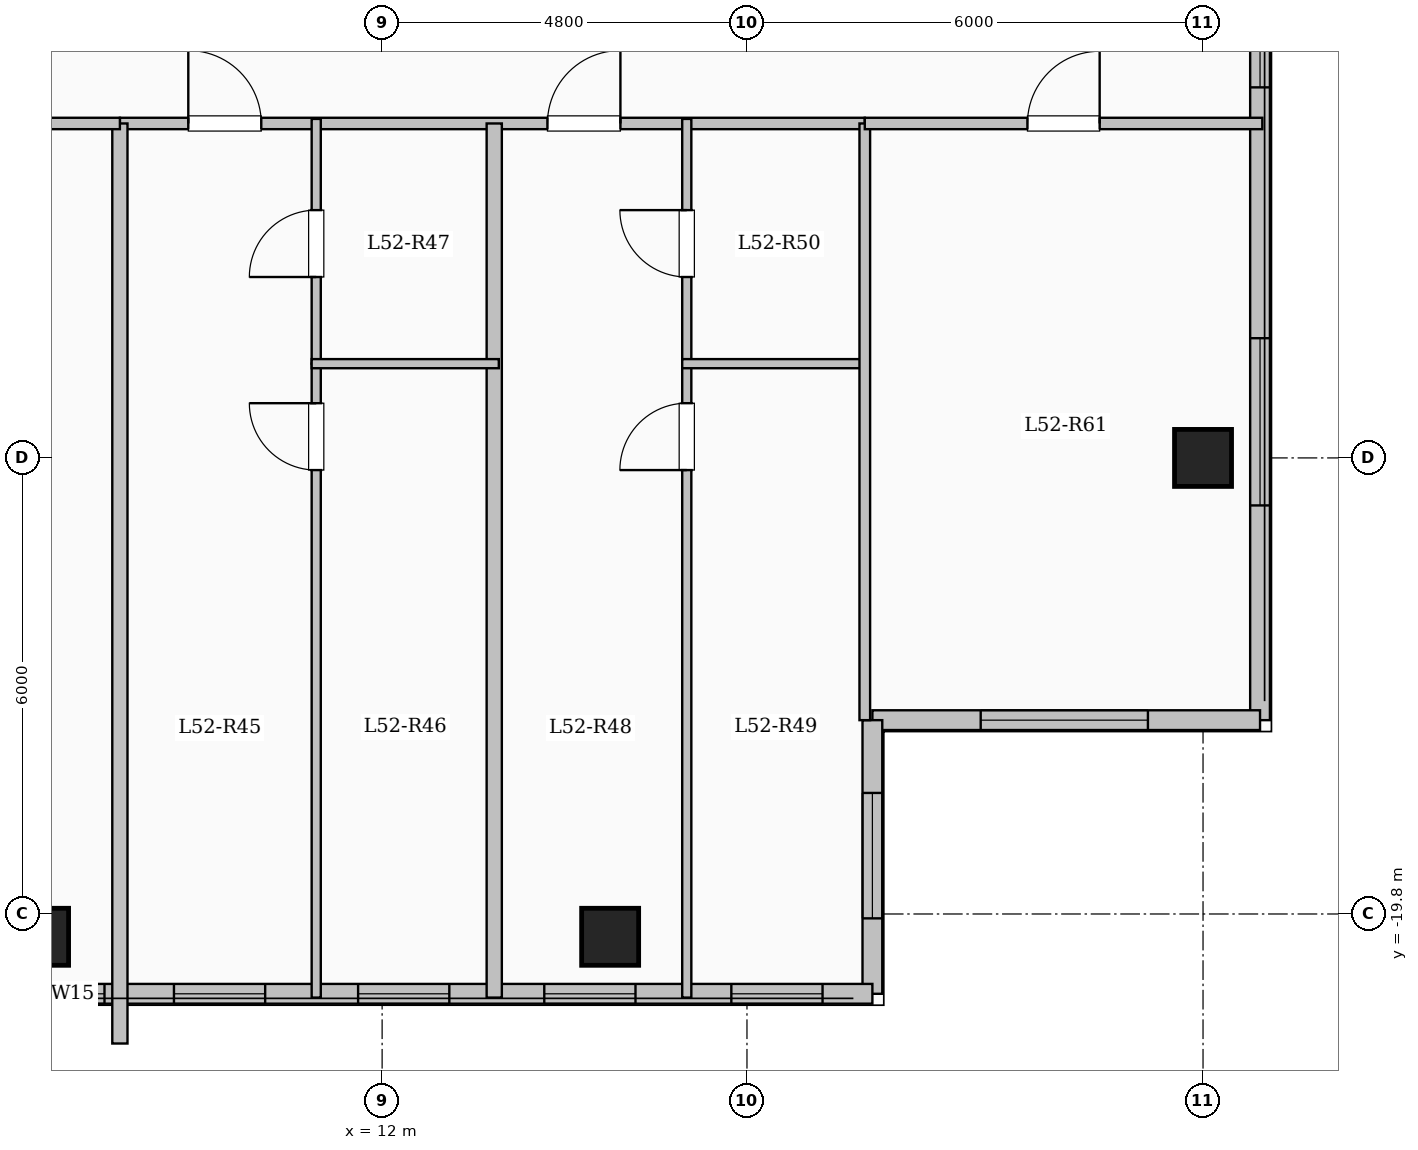
"""IFC4 building model, lengths in metres.
Left out: names, types, materials, properties, quantities, classifications, styles, units other than length and angle.
Written with IfcOpenShell. Run it as: python <this file> out.ifc"""

import sys

from ifc_helpers import new_model, si_unit, direction, frame, frame_2d, origin, origin_2d, place, context, subcontext, project, spatial, rectangle, extrude, element, fill, save


model = new_model("IFC4")
c1 = context("Model", 3, precision=1e-05, world=origin(), true_north=direction((0.0, 1.0)))
c2 = subcontext(c1, "Body", "Model", "MODEL_VIEW")
j1 = project(units=[si_unit("LENGTHUNIT", "METRE"), si_unit("PLANEANGLEUNIT", "RADIAN")], contexts=[c1])
p1 = place(None, origin())
s1 = spatial("IfcSite", under=j1, at=p1, CompositionType="ELEMENT")
p2 = place(p1, origin())
s2 = spatial("IfcBuilding", under=s1, at=p2, CompositionType="ELEMENT")
p3 = place(p2, frame((0.0, 0.0, 193.6)))
s3 = spatial("IfcBuildingStorey", under=s2, at=p3, CompositionType="ELEMENT", Elevation=193.6)
for number, where, z_axis, x_axis in (
    (1, (7.5, -20.1, 0.0), (0.0, 0.0, 1.0), (1.0, 0.0, 0.0)),
    (2, (15.0, -20.1, 0.0), (0.0, 0.0, 1.0), (1.0, 0.0, 0.0)),
    (3, (22.8, -13.8, 0.0), (0.0, 0.0, 1.0), (1.0, 0.0, 0.0)),
):
    element("IfcColumn", number, at=place(p3, frame(where, z_axis=z_axis, x_axis=x_axis)), inside=s3, PredefinedType="COLUMN", context=c2, shape_type="SweptSolid", body=[
        extrude(rectangle(XDim=0.75, YDim=0.75, at=origin_2d()), origin(), (0.0, 0.0, 1.0), 3.35),
    ])
p4 = place(p3, frame((23.55, 17.25, 0.0), z_axis=(0.0, 0.0, 1.0), x_axis=(0.0, -1.0, 0.0)))
e4 = element("IfcWall", 4, at=p4, inside=s3, PredefinedType="SOLIDWALL", context=c2, shape_type="SweptSolid", body=[
    extrude(rectangle(XDim=34.5, YDim=0.26, at=frame_2d((17.25, 0.0))), origin(), (0.0, 0.0, 1.0), 3.1),
])
p5 = place(p4, frame((1.375, 0.0, 0.9)))
e5 = element("IfcOpeningElement", 5, at=p5, cuts=e4, PredefinedType="OPENING", context=c2, shape_type="SweptSolid", body=[
    extrude(rectangle(XDim=2.0, YDim=1.7, at=frame_2d((1.0, 0.85))), frame((0.0, 0.14, 0.0), z_axis=(0.0, -1.0, 0.0), x_axis=(1.0, 0.0, 0.0)), (0.0, 0.0, 1.0), 0.28),
])
p6 = place(p4, frame((5.125, 0.0, 0.95)))
e6 = element("IfcOpeningElement", 6, at=p6, cuts=e4, PredefinedType="OPENING", context=c2, shape_type="SweptSolid", body=[
    extrude(rectangle(XDim=1.0, YDim=1.5, at=frame_2d((0.5, 0.75))), frame((0.0, 0.14, 0.0), z_axis=(0.0, -1.0, 0.0), x_axis=(1.0, 0.0, 0.0)), (0.0, 0.0, 1.0), 0.28),
])
p7 = place(p4, frame((14.5, 0.0, 0.9)))
e7 = element("IfcOpeningElement", 7, at=p7, cuts=e4, PredefinedType="OPENING", context=c2, shape_type="SweptSolid", body=[
    extrude(rectangle(XDim=2.0, YDim=1.7, at=frame_2d((1.0, 0.85))), frame((0.0, 0.14, 0.0), z_axis=(0.0, -1.0, 0.0), x_axis=(1.0, 0.0, 0.0)), (0.0, 0.0, 1.0), 0.28),
])
p8 = place(p4, frame((24.975, 0.0, 0.95)))
e8 = element("IfcOpeningElement", 8, at=p8, cuts=e4, PredefinedType="OPENING", context=c2, shape_type="SweptSolid", body=[
    extrude(rectangle(XDim=1.2, YDim=1.5, at=frame_2d((0.6, 0.75))), frame((0.0, 0.14, 0.0), z_axis=(0.0, -1.0, 0.0), x_axis=(1.0, 0.0, 0.0)), (0.0, 0.0, 1.0), 0.28),
])
p9 = place(p4, frame((29.475, 0.0, 0.9)))
e9 = element("IfcOpeningElement", 9, at=p9, cuts=e4, PredefinedType="OPENING", context=c2, shape_type="SweptSolid", body=[
    extrude(rectangle(XDim=2.2, YDim=1.75, at=frame_2d((1.1, 0.875))), frame((0.0, 0.14, 0.0), z_axis=(0.0, -1.0, 0.0), x_axis=(1.0, 0.0, 0.0)), (0.0, 0.0, 1.0), 0.28),
])
p10 = place(p3, frame((23.55, -17.25, 0.0), z_axis=(0.0, 0.0, 1.0), x_axis=(-1.0, 0.0, 0.0)))
e10 = element("IfcWall", 10, at=p10, inside=s3, PredefinedType="SOLIDWALL", context=c2, shape_type="SweptSolid", body=[
    extrude(rectangle(XDim=5.1, YDim=0.26, at=frame_2d((2.55, 0.0))), origin(), (0.0, 0.0, 1.0), 3.1),
])
p11 = place(p10, frame((1.475, 0.0, 0.9)))
e11 = element("IfcOpeningElement", 11, at=p11, cuts=e10, PredefinedType="OPENING", context=c2, shape_type="SweptSolid", body=[
    extrude(rectangle(XDim=2.2, YDim=1.75, at=frame_2d((1.1, 0.875))), frame((0.0, 0.14, 0.0), z_axis=(0.0, -1.0, 0.0), x_axis=(1.0, 0.0, 0.0)), (0.0, 0.0, 1.0), 0.28),
])
p12 = place(p3, frame((18.45, -17.25, 0.0), z_axis=(0.0, 0.0, 1.0), x_axis=(0.0, -1.0, 0.0)))
e12 = element("IfcWall", 12, at=p12, inside=s3, PredefinedType="SOLIDWALL", context=c2, shape_type="SweptSolid", body=[
    extrude(rectangle(XDim=3.6, YDim=0.26, at=frame_2d((1.8, 0.0))), origin(), (0.0, 0.0, 1.0), 3.1),
])
p13 = place(p12, frame((0.958, 0.0, 0.9)))
e13 = element("IfcOpeningElement", 13, at=p13, cuts=e12, PredefinedType="OPENING", context=c2, shape_type="SweptSolid", body=[
    extrude(rectangle(XDim=1.65, YDim=1.6, at=frame_2d((0.825, 0.8))), frame((0.0, 0.14, 0.0), z_axis=(0.0, -1.0, 0.0), x_axis=(1.0, 0.0, 0.0)), (0.0, 0.0, 1.0), 0.28),
])
p14 = place(p3, frame((18.45, -20.85, 0.0), z_axis=(0.0, 0.0, 1.0), x_axis=(-1.0, 0.0, 0.0)))
e14 = element("IfcWall", 14, at=p14, inside=s3, PredefinedType="SOLIDWALL", context=c2, shape_type="SweptSolid", body=[
    extrude(rectangle(XDim=11.1, YDim=0.26, at=frame_2d((5.55, 0.0))), origin(), (0.0, 0.0, 1.0), 3.1),
])
p15 = place(p14, frame((0.656, 0.0, 0.95)))
e15 = element("IfcOpeningElement", 15, at=p15, cuts=e14, PredefinedType="OPENING", context=c2, shape_type="SweptSolid", body=[
    extrude(rectangle(XDim=1.2, YDim=1.5, at=frame_2d((0.6, 0.75))), frame((0.0, 0.14, 0.0), z_axis=(0.0, -1.0, 0.0), x_axis=(1.0, 0.0, 0.0)), (0.0, 0.0, 1.0), 0.28),
])
p16 = place(p14, frame((3.117, 0.0, 0.95)))
e16 = element("IfcOpeningElement", 16, at=p16, cuts=e14, PredefinedType="OPENING", context=c2, shape_type="SweptSolid", body=[
    extrude(rectangle(XDim=1.2, YDim=1.5, at=frame_2d((0.6, 0.75))), frame((0.0, 0.14, 0.0), z_axis=(0.0, -1.0, 0.0), x_axis=(1.0, 0.0, 0.0)), (0.0, 0.0, 1.0), 0.28),
])
p17 = place(p14, frame((5.566, 0.0, 0.95)))
e17 = element("IfcOpeningElement", 17, at=p17, cuts=e14, PredefinedType="OPENING", context=c2, shape_type="SweptSolid", body=[
    extrude(rectangle(XDim=1.2, YDim=1.5, at=frame_2d((0.6, 0.75))), frame((0.0, 0.14, 0.0), z_axis=(0.0, -1.0, 0.0), x_axis=(1.0, 0.0, 0.0)), (0.0, 0.0, 1.0), 0.28),
])
p18 = place(p14, frame((7.989, 0.0, 0.95)))
e18 = element("IfcOpeningElement", 18, at=p18, cuts=e14, PredefinedType="OPENING", context=c2, shape_type="SweptSolid", body=[
    extrude(rectangle(XDim=1.2, YDim=1.5, at=frame_2d((0.6, 0.75))), frame((0.0, 0.14, 0.0), z_axis=(0.0, -1.0, 0.0), x_axis=(1.0, 0.0, 0.0)), (0.0, 0.0, 1.0), 0.28),
])
p19 = place(p14, frame((10.103, 0.0, 0.95)))
e19 = element("IfcOpeningElement", 19, at=p19, cuts=e14, PredefinedType="OPENING", context=c2, shape_type="SweptSolid", body=[
    extrude(rectangle(XDim=0.85, YDim=1.5, at=frame_2d((0.425, 0.75))), frame((0.0, 0.14, 0.0), z_axis=(0.0, -1.0, 0.0), x_axis=(1.0, 0.0, 0.0)), (0.0, 0.0, 1.0), 0.28),
])
p20 = place(p3, frame((8.55, -9.4, 0.0), z_axis=(0.0, 0.0, 1.0), x_axis=(1.0, 0.0, 0.0)))
e20 = element("IfcWall", 20, at=p20, inside=s3, PredefinedType="PARTITIONING", context=c2, shape_type="SweptSolid", body=[
    extrude(rectangle(XDim=9.8, YDim=0.15, at=frame_2d((4.9, 0.0))), origin(), (0.0, 0.0, 1.0), 3.1),
])
p21 = place(p20, frame((0.9, 0.0, 0.0)))
e21 = element("IfcOpeningElement", 21, at=p21, cuts=e20, PredefinedType="OPENING", context=c2, shape_type="SweptSolid", body=[
    extrude(rectangle(XDim=0.96, YDim=2.15, at=frame_2d((0.48, 1.075))), frame((0.0, 0.085, 0.0), z_axis=(0.0, -1.0, 0.0), x_axis=(1.0, 0.0, 0.0)), (0.0, 0.0, 1.0), 0.17),
])
p22 = place(p20, frame((5.625, 0.0, 0.0)))
e22 = element("IfcOpeningElement", 22, at=p22, cuts=e20, PredefinedType="OPENING", context=c2, shape_type="SweptSolid", body=[
    extrude(rectangle(XDim=0.96, YDim=2.15, at=frame_2d((0.48, 1.075))), frame((0.0, 0.085, 0.0), z_axis=(0.0, -1.0, 0.0), x_axis=(1.0, 0.0, 0.0)), (0.0, 0.0, 1.0), 0.17),
])
p23 = place(p3, frame((13.475, -20.9, 0.0), z_axis=(0.0, 0.0, 1.0), x_axis=(0.0, 1.0, 0.0)))
e23 = element("IfcWall", 23, at=p23, inside=s3, PredefinedType="SOLIDWALL", context=c2, shape_type="SweptSolid", body=[
    extrude(rectangle(XDim=11.5, YDim=0.2, at=frame_2d((5.75, 0.0))), origin(), (0.0, 0.0, 1.0), 3.1),
])
p24 = place(p3, frame((11.133, -20.9, 0.0), z_axis=(0.0, 0.0, 1.0), x_axis=(0.0, 1.0, 0.0)))
e24 = element("IfcWall", 24, at=p24, inside=s3, PredefinedType="PARTITIONING", context=c2, shape_type="SweptSolid", body=[
    extrude(rectangle(XDim=8.34, YDim=0.12, at=frame_2d((4.17, 0.0))), origin(), (0.0, 0.0, 1.0), 3.1),
])
p25 = place(p24, frame((6.94, 0.0, 0.0)))
e25 = element("IfcOpeningElement", 25, at=p25, cuts=e24, PredefinedType="OPENING", context=c2, shape_type="SweptSolid", body=[
    extrude(rectangle(XDim=0.88, YDim=2.1, at=frame_2d((0.44, 1.05))), frame((0.0, 0.07, 0.0), z_axis=(0.0, -1.0, 0.0), x_axis=(1.0, 0.0, 0.0)), (0.0, 0.0, 1.0), 0.14),
])
p26 = place(p3, frame((11.133, -12.56, 0.0), z_axis=(0.0, 0.0, 1.0), x_axis=(0.0, 1.0, 0.0)))
e26 = element("IfcWall", 26, at=p26, inside=s3, PredefinedType="PARTITIONING", context=c2, shape_type="SweptSolid", body=[
    extrude(rectangle(XDim=3.22, YDim=0.12, at=frame_2d((1.61, 0.0))), origin(), (0.0, 0.0, 1.0), 3.1),
])
p27 = place(p26, frame((1.14, 0.0, 0.0)))
e27 = element("IfcOpeningElement", 27, at=p27, cuts=e26, PredefinedType="OPENING", context=c2, shape_type="SweptSolid", body=[
    extrude(rectangle(XDim=0.88, YDim=2.1, at=frame_2d((0.44, 1.05))), frame((0.0, 0.07, 0.0), z_axis=(0.0, -1.0, 0.0), x_axis=(1.0, 0.0, 0.0)), (0.0, 0.0, 1.0), 0.14),
])
p28 = place(p3, frame((11.073, -12.56, 0.0), z_axis=(0.0, 0.0, 1.0), x_axis=(1.0, 0.0, 0.0)))
e28 = element("IfcWall", 28, at=p28, inside=s3, PredefinedType="PARTITIONING", context=c2, shape_type="SweptSolid", body=[
    extrude(rectangle(XDim=2.462, YDim=0.12, at=frame_2d((1.231, 0.0))), origin(), (0.0, 0.0, 1.0), 2.725),
])
p29 = place(p3, frame((16.008, -20.9, 0.0), z_axis=(0.0, 0.0, 1.0), x_axis=(0.0, 1.0, 0.0)))
e29 = element("IfcWall", 29, at=p29, inside=s3, PredefinedType="PARTITIONING", context=c2, shape_type="SweptSolid", body=[
    extrude(rectangle(XDim=8.34, YDim=0.12, at=frame_2d((4.17, 0.0))), origin(), (0.0, 0.0, 1.0), 3.1),
])
p30 = place(p29, frame((6.94, 0.0, 0.0)))
e30 = element("IfcOpeningElement", 30, at=p30, cuts=e29, PredefinedType="OPENING", context=c2, shape_type="SweptSolid", body=[
    extrude(rectangle(XDim=0.88, YDim=2.1, at=frame_2d((0.44, 1.05))), frame((0.0, 0.07, 0.0), z_axis=(0.0, -1.0, 0.0), x_axis=(1.0, 0.0, 0.0)), (0.0, 0.0, 1.0), 0.14),
])
p31 = place(p3, frame((16.008, -12.56, 0.0), z_axis=(0.0, 0.0, 1.0), x_axis=(0.0, 1.0, 0.0)))
e31 = element("IfcWall", 31, at=p31, inside=s3, PredefinedType="PARTITIONING", context=c2, shape_type="SweptSolid", body=[
    extrude(rectangle(XDim=3.22, YDim=0.12, at=frame_2d((1.61, 0.0))), origin(), (0.0, 0.0, 1.0), 3.1),
])
p32 = place(p31, frame((1.14, 0.0, 0.0)))
e32 = element("IfcOpeningElement", 32, at=p32, cuts=e31, PredefinedType="OPENING", context=c2, shape_type="SweptSolid", body=[
    extrude(rectangle(XDim=0.88, YDim=2.1, at=frame_2d((0.44, 1.05))), frame((0.0, 0.07, 0.0), z_axis=(0.0, -1.0, 0.0), x_axis=(1.0, 0.0, 0.0)), (0.0, 0.0, 1.0), 0.14),
])
p33 = place(p3, frame((15.948, -12.56, 0.0), z_axis=(0.0, 0.0, 1.0), x_axis=(1.0, 0.0, 0.0)))
e33 = element("IfcWall", 33, at=p33, inside=s3, PredefinedType="PARTITIONING", context=c2, shape_type="SweptSolid", body=[
    extrude(rectangle(XDim=2.462, YDim=0.12, at=frame_2d((1.231, 0.0))), origin(), (0.0, 0.0, 1.0), 3.1),
])
p34 = place(p3, frame((8.55, -21.504, 0.0), z_axis=(0.0, 0.0, 1.0), x_axis=(0.0, 1.0, 0.0)))
e34 = element("IfcWall", 34, at=p34, inside=s3, PredefinedType="SOLIDWALL", context=c2, shape_type="SweptSolid", body=[
    extrude(rectangle(XDim=12.104, YDim=0.2, at=frame_2d((6.052, 0.0))), origin(), (0.0, 0.0, 1.0), 3.1),
])
p35 = place(p3, frame((-8.55, -9.4, 0.0), z_axis=(0.0, 0.0, 1.0), x_axis=(1.0, 0.0, 0.0)))
e35 = element("IfcWall", 35, at=p35, inside=s3, PredefinedType="PARTITIONING", context=c2, shape_type="SweptSolid", body=[
    extrude(rectangle(XDim=17.1, YDim=0.15, at=frame_2d((8.55, 0.0))), origin(), (0.0, 0.0, 1.0), 3.1),
])
p36 = place(p35, frame((1.9, 0.0, 0.0)))
e36 = element("IfcOpeningElement", 36, at=p36, cuts=e35, PredefinedType="OPENING", context=c2, shape_type="SweptSolid", body=[
    extrude(rectangle(XDim=0.95, YDim=2.15, at=frame_2d((0.475, 1.075))), frame((0.0, 0.085, 0.0), z_axis=(0.0, -1.0, 0.0), x_axis=(1.0, 0.0, 0.0)), (0.0, 0.0, 1.0), 0.17),
])
p37 = place(p35, frame((10.5, 0.0, 0.0)))
e37 = element("IfcOpeningElement", 37, at=p37, cuts=e35, PredefinedType="OPENING", context=c2, shape_type="SweptSolid", body=[
    extrude(rectangle(XDim=0.95, YDim=2.15, at=frame_2d((0.475, 1.075))), frame((0.0, 0.085, 0.0), z_axis=(0.0, -1.0, 0.0), x_axis=(1.0, 0.0, 0.0)), (0.0, 0.0, 1.0), 0.17),
])
p38 = place(p3, frame((18.35, -17.25, 0.0), z_axis=(0.0, 0.0, 1.0), x_axis=(0.0, 1.0, 0.0)))
e38 = element("IfcWall", 38, at=p38, inside=s3, PredefinedType="PARTITIONING", context=c2, shape_type="SweptSolid", body=[
    extrude(rectangle(XDim=7.85, YDim=0.14, at=frame_2d((3.925, 0.0))), origin(), (0.0, 0.0, 1.0), 3.1),
])
p39 = place(p3, frame((18.35, -9.4, 0.0), z_axis=(0.0, 0.0, 1.0), x_axis=(1.0, 0.0, 0.0)))
e39 = element("IfcWall", 39, at=p39, inside=s3, PredefinedType="PARTITIONING", context=c2, shape_type="SweptSolid", body=[
    extrude(rectangle(XDim=5.23, YDim=0.15, at=frame_2d((2.615, 0.0))), origin(), (0.0, 0.0, 1.0), 3.1),
])
p40 = place(p39, frame((2.14, 0.0, 0.0)))
e40 = element("IfcOpeningElement", 40, at=p40, cuts=e39, PredefinedType="OPENING", context=c2, shape_type="SweptSolid", body=[
    extrude(rectangle(XDim=0.95, YDim=2.15, at=frame_2d((0.475, 1.075))), frame((0.0, 0.085, 0.0), z_axis=(0.0, -1.0, 0.0), x_axis=(1.0, 0.0, 0.0)), (0.0, 0.0, 1.0), 0.17),
])
p41 = place(p8, origin())
e41 = element("IfcWindow", 41, at=p41, inside=s3, PartitioningType="SINGLE_PANEL", PredefinedType="WINDOW", context=c2, shape_type="SweptSolid", body=[
    extrude(rectangle(XDim=1.2, YDim=1.5, at=frame_2d((0.6, 0.75))), frame((0.0, 0.03, 0.0), z_axis=(0.0, -1.0, 0.0), x_axis=(1.0, 0.0, 0.0)), (0.0, 0.0, 1.0), 0.06),
])
fill(e8, e41)
p42 = place(p9, origin())
e42 = element("IfcWindow", 42, at=p42, inside=s3, PartitioningType="SINGLE_PANEL", PredefinedType="WINDOW", context=c2, shape_type="SweptSolid", body=[
    extrude(rectangle(XDim=2.2, YDim=1.75, at=frame_2d((1.1, 0.875))), frame((0.0, 0.03, 0.0), z_axis=(0.0, -1.0, 0.0), x_axis=(1.0, 0.0, 0.0)), (0.0, 0.0, 1.0), 0.06),
])
fill(e9, e42)
p43 = place(p11, origin())
e43 = element("IfcWindow", 43, at=p43, inside=s3, PartitioningType="SINGLE_PANEL", PredefinedType="WINDOW", context=c2, shape_type="SweptSolid", body=[
    extrude(rectangle(XDim=2.2, YDim=1.75, at=frame_2d((1.1, 0.875))), frame((0.0, 0.03, 0.0), z_axis=(0.0, -1.0, 0.0), x_axis=(1.0, 0.0, 0.0)), (0.0, 0.0, 1.0), 0.06),
])
fill(e11, e43)
p44 = place(p13, origin())
e44 = element("IfcWindow", 44, at=p44, inside=s3, PartitioningType="SINGLE_PANEL", PredefinedType="WINDOW", context=c2, shape_type="SweptSolid", body=[
    extrude(rectangle(XDim=1.65, YDim=1.6, at=frame_2d((0.825, 0.8))), frame((0.0, 0.03, 0.0), z_axis=(0.0, -1.0, 0.0), x_axis=(1.0, 0.0, 0.0)), (0.0, 0.0, 1.0), 0.06),
])
fill(e13, e44)
p45 = place(p15, origin())
e45 = element("IfcWindow", 45, at=p45, inside=s3, PartitioningType="SINGLE_PANEL", PredefinedType="WINDOW", context=c2, shape_type="SweptSolid", body=[
    extrude(rectangle(XDim=1.2, YDim=1.5, at=frame_2d((0.6, 0.75))), frame((0.0, 0.03, 0.0), z_axis=(0.0, -1.0, 0.0), x_axis=(1.0, 0.0, 0.0)), (0.0, 0.0, 1.0), 0.06),
])
fill(e15, e45)
p46 = place(p16, origin())
e46 = element("IfcWindow", 46, at=p46, inside=s3, PartitioningType="SINGLE_PANEL", PredefinedType="WINDOW", context=c2, shape_type="SweptSolid", body=[
    extrude(rectangle(XDim=1.2, YDim=1.5, at=frame_2d((0.6, 0.75))), frame((0.0, 0.03, 0.0), z_axis=(0.0, -1.0, 0.0), x_axis=(1.0, 0.0, 0.0)), (0.0, 0.0, 1.0), 0.06),
])
fill(e16, e46)
p47 = place(p17, origin())
e47 = element("IfcWindow", 47, at=p47, inside=s3, PartitioningType="SINGLE_PANEL", PredefinedType="WINDOW", context=c2, shape_type="SweptSolid", body=[
    extrude(rectangle(XDim=1.2, YDim=1.5, at=frame_2d((0.6, 0.75))), frame((0.0, 0.03, 0.0), z_axis=(0.0, -1.0, 0.0), x_axis=(1.0, 0.0, 0.0)), (0.0, 0.0, 1.0), 0.06),
])
fill(e17, e47)
p48 = place(p18, origin())
e48 = element("IfcWindow", 48, at=p48, inside=s3, PartitioningType="SINGLE_PANEL", PredefinedType="WINDOW", context=c2, shape_type="SweptSolid", body=[
    extrude(rectangle(XDim=1.2, YDim=1.5, at=frame_2d((0.6, 0.75))), frame((0.0, 0.03, 0.0), z_axis=(0.0, -1.0, 0.0), x_axis=(1.0, 0.0, 0.0)), (0.0, 0.0, 1.0), 0.06),
])
fill(e18, e48)
p49 = place(p19, origin())
e49 = element("IfcWindow", 49, at=p49, inside=s3, PartitioningType="SINGLE_PANEL", PredefinedType="WINDOW", context=c2, shape_type="SweptSolid", body=[
    extrude(rectangle(XDim=0.85, YDim=1.5, at=frame_2d((0.425, 0.75))), frame((0.0, 0.03, 0.0), z_axis=(0.0, -1.0, 0.0), x_axis=(1.0, 0.0, 0.0)), (0.0, 0.0, 1.0), 0.06),
])
fill(e19, e49)
p50 = place(p21, origin())
e50 = element("IfcDoor", 50, at=p50, inside=s3, OperationType="SINGLE_SWING_LEFT", PredefinedType="DOOR", context=c2, shape_type="SweptSolid", body=[
    extrude(rectangle(XDim=0.96, YDim=2.15, at=frame_2d((0.48, 1.075))), frame((0.0, 0.025, 0.0), z_axis=(0.0, -1.0, 0.0), x_axis=(1.0, 0.0, 0.0)), (0.0, 0.0, 1.0), 0.05),
])
fill(e21, e50)
p51 = place(p25, origin())
e51 = element("IfcDoor", 51, at=p51, inside=s3, OperationType="SINGLE_SWING_RIGHT", PredefinedType="DOOR", context=c2, shape_type="SweptSolid", body=[
    extrude(rectangle(XDim=0.88, YDim=2.1, at=frame_2d((0.44, 1.05))), frame((0.0, 0.025, 0.0), z_axis=(0.0, -1.0, 0.0), x_axis=(1.0, 0.0, 0.0)), (0.0, 0.0, 1.0), 0.05),
])
fill(e25, e51)
p52 = place(p27, origin())
e52 = element("IfcDoor", 52, at=p52, inside=s3, OperationType="SINGLE_SWING_LEFT", PredefinedType="DOOR", context=c2, shape_type="SweptSolid", body=[
    extrude(rectangle(XDim=0.88, YDim=2.1, at=frame_2d((0.44, 1.05))), frame((0.0, 0.025, 0.0), z_axis=(0.0, -1.0, 0.0), x_axis=(1.0, 0.0, 0.0)), (0.0, 0.0, 1.0), 0.05),
])
fill(e27, e52)
p53 = place(p22, origin())
e53 = element("IfcDoor", 53, at=p53, inside=s3, OperationType="SINGLE_SWING_RIGHT", PredefinedType="DOOR", context=c2, shape_type="SweptSolid", body=[
    extrude(rectangle(XDim=0.96, YDim=2.15, at=frame_2d((0.48, 1.075))), frame((0.0, 0.025, 0.0), z_axis=(0.0, -1.0, 0.0), x_axis=(1.0, 0.0, 0.0)), (0.0, 0.0, 1.0), 0.05),
])
fill(e22, e53)
p54 = place(p30, origin())
e54 = element("IfcDoor", 54, at=p54, inside=s3, OperationType="SINGLE_SWING_LEFT", PredefinedType="DOOR", context=c2, shape_type="SweptSolid", body=[
    extrude(rectangle(XDim=0.88, YDim=2.1, at=frame_2d((0.44, 1.05))), frame((0.0, 0.025, 0.0), z_axis=(0.0, -1.0, 0.0), x_axis=(1.0, 0.0, 0.0)), (0.0, 0.0, 1.0), 0.05),
])
fill(e30, e54)
p55 = place(p32, origin())
e55 = element("IfcDoor", 55, at=p55, inside=s3, OperationType="SINGLE_SWING_RIGHT", PredefinedType="DOOR", context=c2, shape_type="SweptSolid", body=[
    extrude(rectangle(XDim=0.88, YDim=2.1, at=frame_2d((0.44, 1.05))), frame((0.0, 0.025, 0.0), z_axis=(0.0, -1.0, 0.0), x_axis=(1.0, 0.0, 0.0)), (0.0, 0.0, 1.0), 0.05),
])
fill(e32, e55)
p56 = place(p40, origin())
e56 = element("IfcDoor", 56, at=p56, inside=s3, OperationType="SINGLE_SWING_RIGHT", PredefinedType="DOOR", context=c2, shape_type="SweptSolid", body=[
    extrude(rectangle(XDim=0.95, YDim=2.15, at=frame_2d((0.475, 1.075))), frame((0.0, 0.025, 0.0), z_axis=(0.0, -1.0, 0.0), x_axis=(1.0, 0.0, 0.0)), (0.0, 0.0, 1.0), 0.05),
])
fill(e40, e56)
save(model, sys.argv[1])
